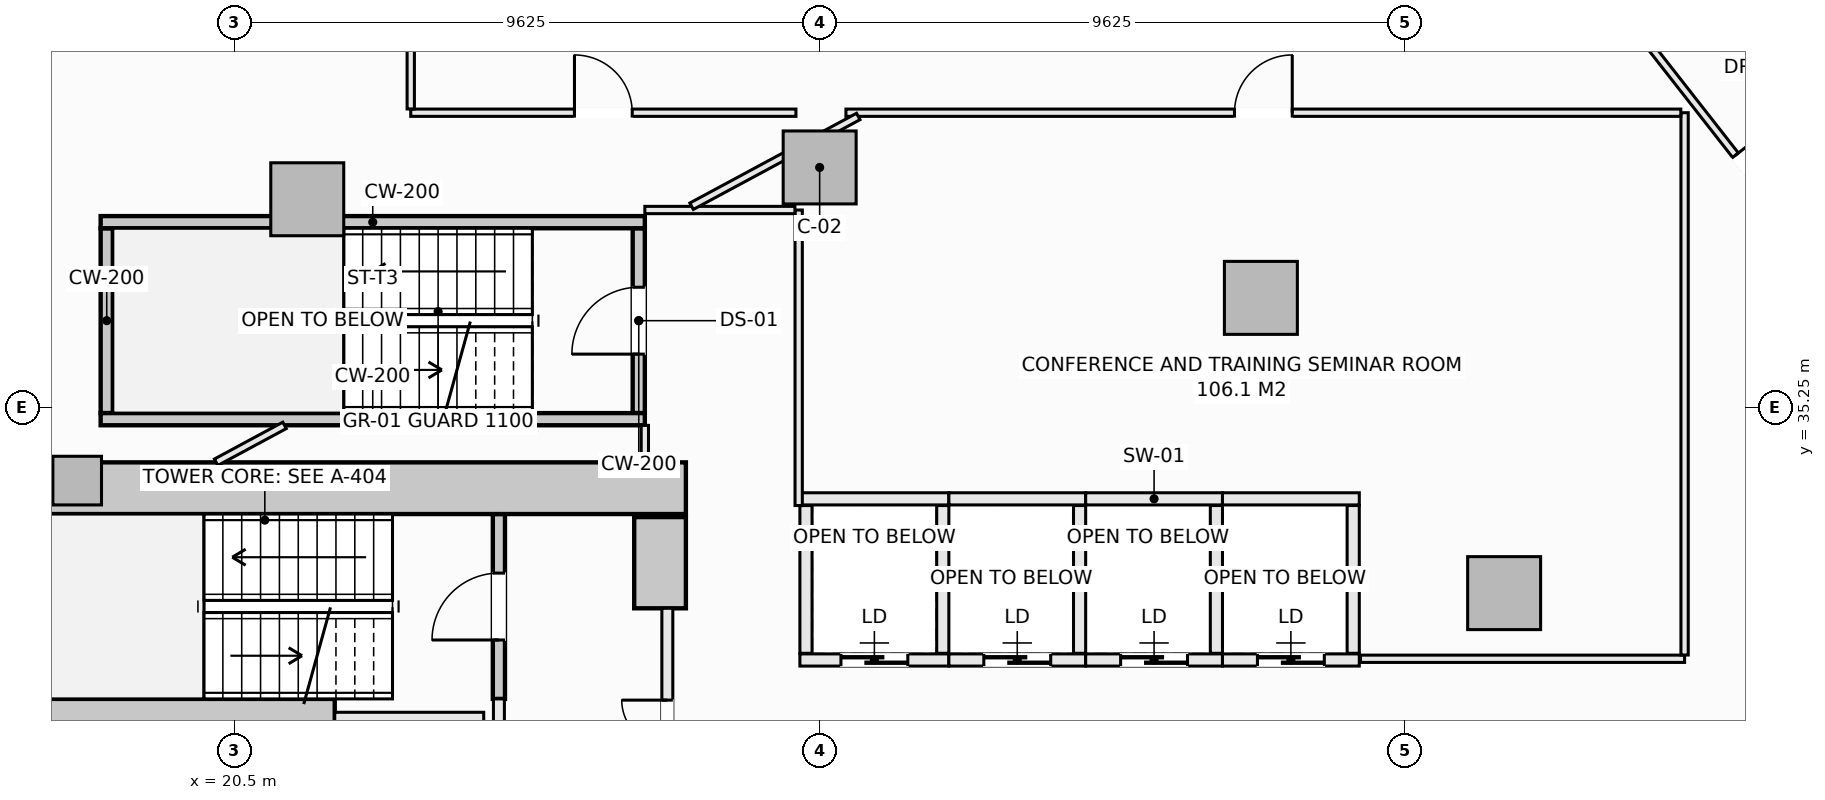
"""IFC4 building model, lengths in metres.
Left out: names, types, materials, properties, quantities, classifications, styles, units other than length and angle.
Written with IfcOpenShell. Run it as: python <this file> out.ifc"""

import sys

from ifc_helpers import new_model, si_unit, direction, frame, frame_2d, origin, origin_2d, place, context, subcontext, project, spatial, rectangle, extrude, element, fill, save


model = new_model("IFC4")
c1 = context("Model", 3, precision=1e-05, world=origin(), true_north=direction((0.0, 1.0)))
c2 = subcontext(c1, "Body", "Model", "MODEL_VIEW")
j1 = project(units=[si_unit("LENGTHUNIT", "METRE"), si_unit("PLANEANGLEUNIT", "RADIAN")], contexts=[c1])
p1 = place(None, origin())
s1 = spatial("IfcSite", under=j1, at=p1, CompositionType="ELEMENT")
p2 = place(p1, origin())
s2 = spatial("IfcBuilding", under=s1, at=p2, CompositionType="ELEMENT")
p3 = place(p2, frame((0.0, 0.0, 34.2)))
s3 = spatial("IfcBuildingStorey", under=s2, at=p3, CompositionType="ELEMENT", Elevation=34.2)
p4 = place(p3, frame((14.075, 33.925, -0.28), z_axis=(0.0, 0.0, 1.0), x_axis=(1.0, 0.0, 0.0)))
e1 = element("IfcWall", 1, at=p4, inside=s3, PredefinedType="SHEAR", context=c2, shape_type="SweptSolid", body=[
    extrude(rectangle(XDim=13.85, YDim=0.85, at=frame_2d((6.925, 0.0))), origin(), (0.0, 0.0, 1.0), 3.85),
])
p5 = place(p3, frame((27.5, 31.95, -0.28), z_axis=(0.0, 0.0, 1.0), x_axis=(0.0, 1.0, 0.0)))
e2 = element("IfcWall", 2, at=p5, inside=s3, PredefinedType="SHEAR", context=c2, shape_type="SweptSolid", body=[
    extrude(rectangle(XDim=1.5, YDim=0.85, at=frame_2d((0.75, 0.0))), origin(), (0.0, 0.0, 1.0), 3.85),
])
p6 = place(p3, frame((14.85, 30.25, -0.28), z_axis=(0.0, 0.0, 1.0), x_axis=(1.0, 0.0, 0.0)))
e3 = element("IfcWall", 3, at=p6, inside=s3, PredefinedType="SHEAR", context=c2, shape_type="SweptSolid", body=[
    extrude(rectangle(XDim=7.3, YDim=0.42, at=frame_2d((3.65, 0.0))), origin(), (0.0, 0.0, 1.0), 3.85),
])
for number, where, z_axis, x_axis in (
    (4, (41.382, 32.199, -0.28), (0.0, 0.0, 1.0), (1.0, 0.0, 0.0)),
    (5, (37.382, 37.055, -0.28), (0.0, 0.0, 1.0), (1.0, 0.0, 0.0)),
    (6, (30.125, 39.2, -0.28), (0.0, 0.0, 1.0), (1.0, 0.0, 0.0)),
    (7, (21.698, 38.677, -0.28), (0.0, 0.0, 1.0), (1.0, 0.0, 0.0)),
):
    element("IfcColumn", number, at=place(p3, frame(where, z_axis=z_axis, x_axis=x_axis)), inside=s3, PredefinedType="COLUMN", context=c2, shape_type="SweptSolid", body=[
        extrude(rectangle(XDim=1.2, YDim=1.2, at=origin_2d()), origin(), (0.0, 0.0, 1.0), 3.85),
    ])
p7 = place(p3, frame((17.914, 34.05, -0.28), z_axis=(0.0, 0.0, 1.0), x_axis=(1.0, 0.0, 0.0)))
e8 = element("IfcColumn", 8, at=p7, inside=s3, PredefinedType="PILASTER", context=c2, shape_type="SweptSolid", body=[
    extrude(rectangle(XDim=0.8, YDim=0.8, at=origin_2d()), origin(), (0.0, 0.0, 1.0), 3.85),
])
p8 = place(p3, frame((24.85, 30.46, -0.28), z_axis=(0.0, 0.0, 1.0), x_axis=(0.0, 1.0, 0.0)))
e9 = element("IfcWall", 9, at=p8, inside=s3, PredefinedType="SHEAR", context=c2, shape_type="SweptSolid", body=[
    extrude(rectangle(XDim=3.038, YDim=0.2, at=frame_2d((1.519, 0.0))), origin(), (0.0, 0.0, 1.0), 3.85),
])
p9 = place(p8, frame((0.969, 0.0, 0.28)))
e10 = element("IfcOpeningElement", 10, at=p9, cuts=e9, PredefinedType="OPENING", context=c2, shape_type="SweptSolid", body=[
    extrude(rectangle(XDim=1.1, YDim=2.15, at=frame_2d((0.55, 1.075))), frame((0.0, 0.11, 0.0), z_axis=(0.0, -1.0, 0.0), x_axis=(1.0, 0.0, 0.0)), (0.0, 0.0, 1.0), 0.22),
])
p10 = place(p3, frame((27.15, 35.16, -0.28), z_axis=(0.0, 0.0, 1.0), x_axis=(0.0, 1.0, 0.0)))
e11 = element("IfcWall", 11, at=p10, inside=s3, PredefinedType="SHEAR", context=c2, shape_type="SweptSolid", body=[
    extrude(rectangle(XDim=3.04, YDim=0.2, at=frame_2d((1.52, 0.0))), origin(), (0.0, 0.0, 1.0), 3.85),
])
p11 = place(p10, frame((0.97, 0.0, 0.28)))
e12 = element("IfcOpeningElement", 12, at=p11, cuts=e11, PredefinedType="OPENING", context=c2, shape_type="SweptSolid", body=[
    extrude(rectangle(XDim=1.1, YDim=2.15, at=frame_2d((0.55, 1.075))), frame((0.0, 0.11, 0.0), z_axis=(0.0, -1.0, 0.0), x_axis=(1.0, 0.0, 0.0)), (0.0, 0.0, 1.0), 0.22),
])
p12 = place(p3, frame((18.4, 35.16, -0.28), z_axis=(0.0, 0.0, 1.0), x_axis=(0.0, 1.0, 0.0)))
e13 = element("IfcWall", 13, at=p12, inside=s3, PredefinedType="SHEAR", context=c2, shape_type="SweptSolid", body=[
    extrude(rectangle(XDim=3.04, YDim=0.2, at=frame_2d((1.52, 0.0))), origin(), (0.0, 0.0, 1.0), 3.85),
])
for number, where, z_axis, x_axis in (
    (14, (18.3, 38.3, -0.28), (0.0, 0.0, 1.0), (1.0, 0.0, 0.0)),
    (15, (18.3, 35.06, -0.28), (0.0, 0.0, 1.0), (1.0, 0.0, 0.0)),
):
    element("IfcWall", number, at=place(p3, frame(where, z_axis=z_axis, x_axis=x_axis)), inside=s3, PredefinedType="SHEAR", context=c2, shape_type="SweptSolid", body=[
        extrude(rectangle(XDim=8.95, YDim=0.2, at=frame_2d((4.475, 0.0))), origin(), (0.0, 0.0, 1.0), 3.85),
    ])
p13 = place(p3, frame((22.15, 30.14, 0.0), z_axis=(0.0, 0.0, 1.0), x_axis=(1.0, 0.0, 0.0)))
e16 = element("IfcWall", 16, at=p13, inside=s3, PredefinedType="SOLIDWALL", context=c2, shape_type="SweptSolid", body=[
    extrude(rectangle(XDim=2.45, YDim=0.2, at=frame_2d((1.225, 0.0))), origin(), (0.0, 0.0, 1.0), 3.57),
])
p14 = place(p3, frame((29.8, 33.75, 0.0), z_axis=(0.0, 0.0, 1.0), x_axis=(1.0, 0.0, 0.0)))
e17 = element("IfcWall", 17, at=p14, inside=s3, PredefinedType="SOLIDWALL", context=c2, shape_type="SweptSolid", body=[
    extrude(rectangle(XDim=2.45, YDim=0.2, at=frame_2d((1.225, 0.0))), origin(), (0.0, 0.0, 1.0), 3.57),
])
p15 = place(p3, frame((29.8, 31.1, 0.0), z_axis=(0.0, 0.0, 1.0), x_axis=(1.0, 0.0, 0.0)))
e18 = element("IfcWall", 18, at=p15, inside=s3, PredefinedType="SOLIDWALL", context=c2, shape_type="SweptSolid", body=[
    extrude(rectangle(XDim=2.45, YDim=0.2, at=frame_2d((1.225, 0.0))), origin(), (0.0, 0.0, 1.0), 3.57),
])
p16 = place(p15, frame((0.675, 0.0, 0.0)))
e19 = element("IfcOpeningElement", 19, at=p16, cuts=e18, PredefinedType="OPENING", context=c2, shape_type="SweptSolid", body=[
    extrude(rectangle(XDim=1.1, YDim=2.2, at=frame_2d((0.55, 1.1))), frame((0.0, 0.11, 0.0), z_axis=(0.0, -1.0, 0.0), x_axis=(1.0, 0.0, 0.0)), (0.0, 0.0, 1.0), 0.22),
])
for number, where, z_axis, x_axis in (
    (20, (29.9, 31.21, 0.0), (0.0, 0.0, 1.0), (0.0, 1.0, 0.0)),
    (21, (32.15, 31.21, 0.0), (0.0, 0.0, 1.0), (0.0, 1.0, 0.0)),
):
    element("IfcWall", number, at=place(p3, frame(where, z_axis=z_axis, x_axis=x_axis)), inside=s3, PredefinedType="SOLIDWALL", context=c2, shape_type="SweptSolid", body=[
        extrude(rectangle(XDim=2.43, YDim=0.2, at=frame_2d((1.215, 0.0))), origin(), (0.0, 0.0, 1.0), 3.57),
    ])
p17 = place(p3, frame((32.25, 33.75, 0.0), z_axis=(0.0, 0.0, 1.0), x_axis=(1.0, 0.0, 0.0)))
e22 = element("IfcWall", 22, at=p17, inside=s3, PredefinedType="SOLIDWALL", context=c2, shape_type="SweptSolid", body=[
    extrude(rectangle(XDim=2.25, YDim=0.2, at=frame_2d((1.125, 0.0))), origin(), (0.0, 0.0, 1.0), 3.57),
])
p18 = place(p3, frame((32.25, 31.1, 0.0), z_axis=(0.0, 0.0, 1.0), x_axis=(1.0, 0.0, 0.0)))
e23 = element("IfcWall", 23, at=p18, inside=s3, PredefinedType="SOLIDWALL", context=c2, shape_type="SweptSolid", body=[
    extrude(rectangle(XDim=2.25, YDim=0.2, at=frame_2d((1.125, 0.0))), origin(), (0.0, 0.0, 1.0), 3.57),
])
p19 = place(p18, frame((0.575, 0.0, 0.0)))
e24 = element("IfcOpeningElement", 24, at=p19, cuts=e23, PredefinedType="OPENING", context=c2, shape_type="SweptSolid", body=[
    extrude(rectangle(XDim=1.1, YDim=2.2, at=frame_2d((0.55, 1.1))), frame((0.0, 0.11, 0.0), z_axis=(0.0, -1.0, 0.0), x_axis=(1.0, 0.0, 0.0)), (0.0, 0.0, 1.0), 0.22),
])
p20 = place(p3, frame((34.4, 31.21, 0.0), z_axis=(0.0, 0.0, 1.0), x_axis=(0.0, 1.0, 0.0)))
e25 = element("IfcWall", 25, at=p20, inside=s3, PredefinedType="SOLIDWALL", context=c2, shape_type="SweptSolid", body=[
    extrude(rectangle(XDim=2.43, YDim=0.2, at=frame_2d((1.215, 0.0))), origin(), (0.0, 0.0, 1.0), 3.57),
])
p21 = place(p3, frame((34.5, 33.75, 0.0), z_axis=(0.0, 0.0, 1.0), x_axis=(1.0, 0.0, 0.0)))
e26 = element("IfcWall", 26, at=p21, inside=s3, PredefinedType="SOLIDWALL", context=c2, shape_type="SweptSolid", body=[
    extrude(rectangle(XDim=2.25, YDim=0.2, at=frame_2d((1.125, 0.0))), origin(), (0.0, 0.0, 1.0), 3.57),
])
p22 = place(p3, frame((34.5, 31.1, 0.0), z_axis=(0.0, 0.0, 1.0), x_axis=(1.0, 0.0, 0.0)))
e27 = element("IfcWall", 27, at=p22, inside=s3, PredefinedType="SOLIDWALL", context=c2, shape_type="SweptSolid", body=[
    extrude(rectangle(XDim=2.25, YDim=0.2, at=frame_2d((1.125, 0.0))), origin(), (0.0, 0.0, 1.0), 3.57),
])
p23 = place(p22, frame((0.575, 0.0, 0.0)))
e28 = element("IfcOpeningElement", 28, at=p23, cuts=e27, PredefinedType="OPENING", context=c2, shape_type="SweptSolid", body=[
    extrude(rectangle(XDim=1.1, YDim=2.2, at=frame_2d((0.55, 1.1))), frame((0.0, 0.11, 0.0), z_axis=(0.0, -1.0, 0.0), x_axis=(1.0, 0.0, 0.0)), (0.0, 0.0, 1.0), 0.22),
])
p24 = place(p3, frame((36.65, 31.21, 0.0), z_axis=(0.0, 0.0, 1.0), x_axis=(0.0, 1.0, 0.0)))
e29 = element("IfcWall", 29, at=p24, inside=s3, PredefinedType="SOLIDWALL", context=c2, shape_type="SweptSolid", body=[
    extrude(rectangle(XDim=2.43, YDim=0.2, at=frame_2d((1.215, 0.0))), origin(), (0.0, 0.0, 1.0), 3.57),
])
p25 = place(p3, frame((36.75, 33.75, 0.0), z_axis=(0.0, 0.0, 1.0), x_axis=(1.0, 0.0, 0.0)))
e30 = element("IfcWall", 30, at=p25, inside=s3, PredefinedType="SOLIDWALL", context=c2, shape_type="SweptSolid", body=[
    extrude(rectangle(XDim=2.25, YDim=0.2, at=frame_2d((1.125, 0.0))), origin(), (0.0, 0.0, 1.0), 3.57),
])
p26 = place(p3, frame((36.75, 31.1, 0.0), z_axis=(0.0, 0.0, 1.0), x_axis=(1.0, 0.0, 0.0)))
e31 = element("IfcWall", 31, at=p26, inside=s3, PredefinedType="SOLIDWALL", context=c2, shape_type="SweptSolid", body=[
    extrude(rectangle(XDim=2.25, YDim=0.2, at=frame_2d((1.125, 0.0))), origin(), (0.0, 0.0, 1.0), 3.57),
])
p27 = place(p26, frame((0.575, 0.0, 0.0)))
e32 = element("IfcOpeningElement", 32, at=p27, cuts=e31, PredefinedType="OPENING", context=c2, shape_type="SweptSolid", body=[
    extrude(rectangle(XDim=1.1, YDim=2.2, at=frame_2d((0.55, 1.1))), frame((0.0, 0.11, 0.0), z_axis=(0.0, -1.0, 0.0), x_axis=(1.0, 0.0, 0.0)), (0.0, 0.0, 1.0), 0.22),
])
p28 = place(p3, frame((38.9, 31.21, 0.0), z_axis=(0.0, 0.0, 1.0), x_axis=(0.0, 1.0, 0.0)))
e33 = element("IfcWall", 33, at=p28, inside=s3, PredefinedType="SOLIDWALL", context=c2, shape_type="SweptSolid", body=[
    extrude(rectangle(XDim=2.43, YDim=0.2, at=frame_2d((1.215, 0.0))), origin(), (0.0, 0.0, 1.0), 3.57),
])
p29 = place(p3, frame((24.85, 30.04, 0.0), z_axis=(0.0, 0.0, 1.0), x_axis=(0.0, 1.0, 0.0)))
e34 = element("IfcWall", 34, at=p29, inside=s3, PredefinedType="SOLIDWALL", context=c2, shape_type="SweptSolid", body=[
    extrude(rectangle(XDim=0.42, YDim=0.18, at=frame_2d((0.21, 0.0))), origin(), (0.0, 0.0, 1.0), 3.57),
])
p30 = place(p3, frame((27.62, 22.05, 0.0), z_axis=(0.0, 0.0, 1.0), x_axis=(0.0, 1.0, 0.0)))
e35 = element("IfcWall", 35, at=p30, inside=s3, PredefinedType="SOLIDWALL", context=c2, shape_type="SweptSolid", body=[
    extrude(rectangle(XDim=9.9, YDim=0.18, at=frame_2d((4.95, 0.0))), origin(), (0.0, 0.0, 1.0), 2.662),
])
p31 = place(p30, frame((4.475, 0.0, 0.0)))
e36 = element("IfcOpeningElement", 36, at=p31, cuts=e35, PredefinedType="OPENING", context=c2, shape_type="SweptSolid", body=[
    extrude(rectangle(XDim=0.95, YDim=2.1, at=frame_2d((0.475, 1.05))), frame((0.0, 0.1, 0.0), z_axis=(0.0, -1.0, 0.0), x_axis=(1.0, 0.0, 0.0)), (0.0, 0.0, 1.0), 0.2),
])
p32 = place(p30, frame((6.89, 0.0, 0.0)))
e37 = element("IfcOpeningElement", 37, at=p32, cuts=e35, PredefinedType="OPENING", context=c2, shape_type="SweptSolid", body=[
    extrude(rectangle(XDim=1.5, YDim=2.2, at=frame_2d((0.75, 1.1))), frame((0.0, 0.1, 0.0), z_axis=(0.0, -1.0, 0.0), x_axis=(1.0, 0.0, 0.0)), (0.0, 0.0, 1.0), 0.2),
])
p33 = place(p30, frame((1.51, 0.0, 0.0)))
e38 = element("IfcOpeningElement", 38, at=p33, cuts=e35, PredefinedType="OPENING", context=c2, shape_type="SweptSolid", body=[
    extrude(rectangle(XDim=1.5, YDim=2.2, at=frame_2d((0.75, 1.1))), frame((0.0, 0.1, 0.0), z_axis=(0.0, -1.0, 0.0), x_axis=(1.0, 0.0, 0.0)), (0.0, 0.0, 1.0), 0.2),
])
p34 = place(p3, frame((29.78, 33.64, 0.0), z_axis=(0.0, 0.0, 1.0), x_axis=(0.0, 1.0, 0.0)))
e39 = element("IfcWall", 39, at=p34, inside=s3, PredefinedType="PARTITIONING", context=c2, shape_type="SweptSolid", body=[
    extrude(rectangle(XDim=4.86, YDim=0.12, at=frame_2d((2.43, 0.0))), origin(), (0.0, 0.0, 1.0), 3.57),
])
p35 = place(p3, frame((39.02, 31.12, 0.0), z_axis=(0.0, 0.0, 1.0), x_axis=(1.0, 0.0, 0.0)))
e40 = element("IfcWall", 40, at=p35, inside=s3, PredefinedType="PARTITIONING", context=c2, shape_type="SweptSolid", body=[
    extrude(rectangle(XDim=5.33, YDim=0.12, at=frame_2d((2.665, 0.0))), origin(), (0.0, 0.0, 1.0), 3.57),
])
p36 = place(p3, frame((44.35, 31.182, 0.0), z_axis=(0.0, 0.0, 1.0), x_axis=(0.0, 1.0, 0.0)))
e41 = element("IfcWall", 41, at=p36, inside=s3, PredefinedType="PARTITIONING", context=c2, shape_type="SweptSolid", body=[
    extrude(rectangle(XDim=8.918, YDim=0.12, at=frame_2d((4.459, 0.0))), origin(), (0.0, 0.0, 1.0), 3.57),
])
p37 = place(p3, frame((23.4, 40.1, 0.0), z_axis=(0.0, 0.0, 1.0), x_axis=(1.0, 0.0, 0.0)))
e42 = element("IfcWall", 42, at=p37, inside=s3, PredefinedType="PARTITIONING", context=c2, shape_type="SweptSolid", body=[
    extrude(rectangle(XDim=6.335, YDim=0.12, at=frame_2d((3.167, 0.0))), origin(), (0.0, 0.0, 1.0), 3.57),
])
p38 = place(p37, frame((2.692, 0.0, 0.0)))
e43 = element("IfcOpeningElement", 43, at=p38, cuts=e42, PredefinedType="OPENING", context=c2, shape_type="SweptSolid", body=[
    extrude(rectangle(XDim=0.95, YDim=2.1, at=frame_2d((0.475, 1.05))), frame((0.0, 0.07, 0.0), z_axis=(0.0, -1.0, 0.0), x_axis=(1.0, 0.0, 0.0)), (0.0, 0.0, 1.0), 0.14),
])
p39 = place(p3, frame((30.557, 40.1, 0.0), z_axis=(0.0, 0.0, 1.0), x_axis=(1.0, 0.0, 0.0)))
e44 = element("IfcWall", 44, at=p39, inside=s3, PredefinedType="PARTITIONING", context=c2, shape_type="SweptSolid", body=[
    extrude(rectangle(XDim=13.731, YDim=0.12, at=frame_2d((6.866, 0.0))), origin(), (0.0, 0.0, 1.0), 3.57),
])
p40 = place(p39, frame((6.39, 0.0, 0.0)))
e45 = element("IfcOpeningElement", 45, at=p40, cuts=e44, PredefinedType="OPENING", context=c2, shape_type="SweptSolid", body=[
    extrude(rectangle(XDim=0.95, YDim=2.1, at=frame_2d((0.475, 1.05))), frame((0.0, 0.07, 0.0), z_axis=(0.0, -1.0, 0.0), x_axis=(1.0, 0.0, 0.0)), (0.0, 0.0, 1.0), 0.14),
])
p41 = place(p3, frame((23.4, 40.162, 0.0), z_axis=(0.0, 0.0, 1.0), x_axis=(0.0, 1.0, 0.0)))
e46 = element("IfcWall", 46, at=p41, inside=s3, PredefinedType="PARTITIONING", context=c2, shape_type="SweptSolid", body=[
    extrude(rectangle(XDim=1.886, YDim=0.12, at=frame_2d((0.943, 0.0))), origin(), (0.0, 0.0, 1.0), 3.57),
])
p42 = place(p3, frame((43.137, 42.02, 0.0), z_axis=(0.0, 0.0, 1.0), x_axis=(0.616441660183, -0.787400583941, 0.0)))
e47 = element("IfcWall", 47, at=p42, inside=s3, PredefinedType="PARTITIONING", context=c2, shape_type="SweptSolid", body=[
    extrude(rectangle(XDim=5.083, YDim=0.12, at=frame_2d((2.541, 0.0))), origin(), (0.0, 0.0, 1.0), 3.57),
])
p43 = place(p42, frame((3.326, 0.0, 0.0)))
e48 = element("IfcOpeningElement", 48, at=p43, cuts=e47, PredefinedType="OPENING", context=c2, shape_type="SweptSolid", body=[
    extrude(rectangle(XDim=0.95, YDim=2.1, at=frame_2d((0.475, 1.05))), frame((0.0, 0.07, 0.0), z_axis=(0.0, -1.0, 0.0), x_axis=(1.0, 0.0, 0.0)), (0.0, 0.0, 1.0), 0.14),
])
p44 = place(p3, frame((27.25, 34.352, 0.0), z_axis=(0.0, 0.0, 1.0), x_axis=(0.0, 1.0, 0.0)))
e49 = element("IfcWall", 49, at=p44, inside=s3, PredefinedType="PARTITIONING", context=c2, shape_type="SweptSolid", body=[
    extrude(rectangle(XDim=0.606, YDim=0.12, at=frame_2d((0.303, 0.0))), origin(), (0.0, 0.0, 1.0), 3.57),
])
p45 = place(p3, frame((27.25, 38.5, 0.0), z_axis=(0.0, 0.0, 1.0), x_axis=(1.0, 0.0, 0.0)))
e50 = element("IfcWall", 50, at=p45, inside=s3, PredefinedType="PARTITIONING", context=c2, shape_type="SweptSolid", body=[
    extrude(rectangle(XDim=2.468, YDim=0.12, at=frame_2d((1.234, 0.0))), origin(), (0.0, 0.0, 1.0), 3.57),
])
p46 = place(p3, frame((20.199, 34.352, 0.0), z_axis=(0.0, 0.0, 1.0), x_axis=(0.880495630453, 0.474054263511, 0.0)))
e51 = element("IfcWall", 51, at=p46, inside=s3, PredefinedType="PARTITIONING", context=c2, shape_type="SweptSolid", body=[
    extrude(rectangle(XDim=1.278, YDim=0.12, at=frame_2d((0.639, 0.0))), origin(), (0.0, 0.0, 1.0), 3.57),
])
p47 = place(p3, frame((28.019, 38.562, 0.0), z_axis=(0.0, 0.0, 1.0), x_axis=(0.880483688628, 0.474076443267, 0.0)))
e52 = element("IfcWall", 52, at=p47, inside=s3, PredefinedType="PARTITIONING", context=c2, shape_type="SweptSolid", body=[
    extrude(rectangle(XDim=3.114, YDim=0.12, at=frame_2d((1.557, 0.0))), origin(), (0.0, 0.0, 1.0), 2.934),
])
p48 = place(p9, origin())
e53 = element("IfcDoor", 53, at=p48, inside=s3, OperationType="SINGLE_SWING_LEFT", PredefinedType="DOOR", context=c2, shape_type="SweptSolid", body=[
    extrude(rectangle(XDim=1.1, YDim=2.15, at=frame_2d((0.55, 1.075))), frame((0.0, 0.025, 0.0), z_axis=(0.0, -1.0, 0.0), x_axis=(1.0, 0.0, 0.0)), (0.0, 0.0, 1.0), 0.05),
])
fill(e10, e53)
p49 = place(p11, origin())
e54 = element("IfcDoor", 54, at=p49, inside=s3, OperationType="SINGLE_SWING_LEFT", PredefinedType="DOOR", context=c2, shape_type="SweptSolid", body=[
    extrude(rectangle(XDim=1.1, YDim=2.15, at=frame_2d((0.55, 1.075))), frame((0.0, 0.025, 0.0), z_axis=(0.0, -1.0, 0.0), x_axis=(1.0, 0.0, 0.0)), (0.0, 0.0, 1.0), 0.05),
])
fill(e12, e54)
p50 = place(p16, origin())
e55 = element("IfcDoor", 55, at=p50, inside=s3, OperationType="SLIDING_TO_LEFT", PredefinedType="DOOR", context=c2, shape_type="SweptSolid", body=[
    extrude(rectangle(XDim=1.1, YDim=2.2, at=frame_2d((0.55, 1.1))), frame((0.0, 0.025, 0.0), z_axis=(0.0, -1.0, 0.0), x_axis=(1.0, 0.0, 0.0)), (0.0, 0.0, 1.0), 0.05),
])
fill(e19, e55)
p51 = place(p19, origin())
e56 = element("IfcDoor", 56, at=p51, inside=s3, OperationType="SLIDING_TO_LEFT", PredefinedType="DOOR", context=c2, shape_type="SweptSolid", body=[
    extrude(rectangle(XDim=1.1, YDim=2.2, at=frame_2d((0.55, 1.1))), frame((0.0, 0.025, 0.0), z_axis=(0.0, -1.0, 0.0), x_axis=(1.0, 0.0, 0.0)), (0.0, 0.0, 1.0), 0.05),
])
fill(e24, e56)
p52 = place(p23, origin())
e57 = element("IfcDoor", 57, at=p52, inside=s3, OperationType="SLIDING_TO_LEFT", PredefinedType="DOOR", context=c2, shape_type="SweptSolid", body=[
    extrude(rectangle(XDim=1.1, YDim=2.2, at=frame_2d((0.55, 1.1))), frame((0.0, 0.025, 0.0), z_axis=(0.0, -1.0, 0.0), x_axis=(1.0, 0.0, 0.0)), (0.0, 0.0, 1.0), 0.05),
])
fill(e28, e57)
p53 = place(p27, origin())
e58 = element("IfcDoor", 58, at=p53, inside=s3, OperationType="SLIDING_TO_LEFT", PredefinedType="DOOR", context=c2, shape_type="SweptSolid", body=[
    extrude(rectangle(XDim=1.1, YDim=2.2, at=frame_2d((0.55, 1.1))), frame((0.0, 0.025, 0.0), z_axis=(0.0, -1.0, 0.0), x_axis=(1.0, 0.0, 0.0)), (0.0, 0.0, 1.0), 0.05),
])
fill(e32, e58)
p54 = place(p32, origin())
e59 = element("IfcDoor", 59, at=p54, inside=s3, OperationType="DOUBLE_DOOR_SINGLE_SWING", PredefinedType="DOOR", context=c2, shape_type="SweptSolid", body=[
    extrude(rectangle(XDim=1.5, YDim=2.2, at=frame_2d((0.75, 1.1))), frame((0.0, 0.025, 0.0), z_axis=(0.0, -1.0, 0.0), x_axis=(1.0, 0.0, 0.0)), (0.0, 0.0, 1.0), 0.05),
])
fill(e37, e59)
p55 = place(p43, origin())
e60 = element("IfcDoor", 60, at=p55, inside=s3, OperationType="SINGLE_SWING_LEFT", PredefinedType="DOOR", context=c2, shape_type="SweptSolid", body=[
    extrude(rectangle(XDim=0.95, YDim=2.1, at=frame_2d((0.475, 1.05))), frame((0.0, 0.025, 0.0), z_axis=(0.0, -1.0, 0.0), x_axis=(1.0, 0.0, 0.0)), (0.0, 0.0, 1.0), 0.05),
])
fill(e48, e60)
p56 = place(p40, origin())
e61 = element("IfcDoor", 61, at=p56, inside=s3, OperationType="SINGLE_SWING_RIGHT", PredefinedType="DOOR", context=c2, shape_type="SweptSolid", body=[
    extrude(rectangle(XDim=0.95, YDim=2.1, at=frame_2d((0.475, 1.05))), frame((0.0, 0.025, 0.0), z_axis=(0.0, -1.0, 0.0), x_axis=(1.0, 0.0, 0.0)), (0.0, 0.0, 1.0), 0.05),
])
fill(e45, e61)
p57 = place(p38, origin())
e62 = element("IfcDoor", 62, at=p57, inside=s3, OperationType="SINGLE_SWING_LEFT", PredefinedType="DOOR", context=c2, shape_type="SweptSolid", body=[
    extrude(rectangle(XDim=0.95, YDim=2.1, at=frame_2d((0.475, 1.05))), frame((0.0, 0.025, 0.0), z_axis=(0.0, -1.0, 0.0), x_axis=(1.0, 0.0, 0.0)), (0.0, 0.0, 1.0), 0.05),
])
fill(e43, e62)
save(model, sys.argv[1])
